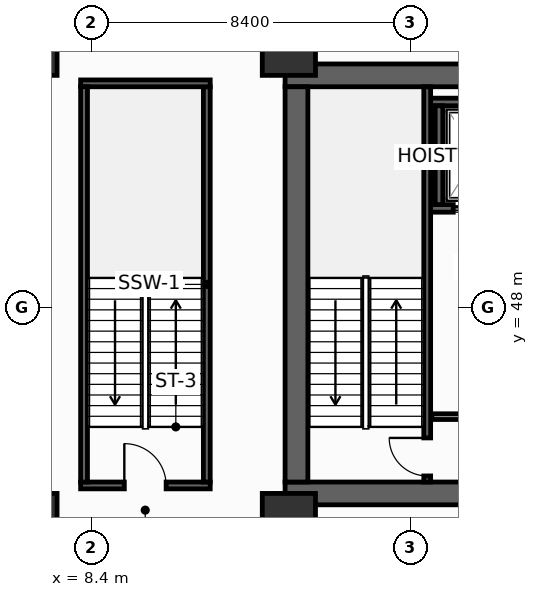
"""IFC4 building model, lengths in metres.
Left out: names, types, materials, properties, quantities, classifications, styles, units other than length and angle.
Written with IfcOpenShell. Run it as: python <this file> out.ifc"""

import sys

from ifc_helpers import new_model, si_unit, direction, frame, frame_2d, origin, origin_2d, place, context, subcontext, project, spatial, rectangle, hollow_rectangle, extrude, element, fill, save


model = new_model("IFC4")
c1 = context("Model", 3, precision=1e-05, world=origin(), true_north=direction((0.0, 1.0)))
c2 = subcontext(c1, "Body", "Model", "MODEL_VIEW")
j1 = project(units=[si_unit("LENGTHUNIT", "METRE"), si_unit("PLANEANGLEUNIT", "RADIAN")], contexts=[c1])
p1 = place(None, origin())
s1 = spatial("IfcSite", under=j1, at=p1, CompositionType="ELEMENT")
p2 = place(p1, origin())
s2 = spatial("IfcBuilding", under=s1, at=p2, CompositionType="ELEMENT")
p3 = place(p2, frame((0.0, 0.0, 6.0)))
s3 = spatial("IfcBuildingStorey", under=s2, at=p3, CompositionType="ELEMENT", Elevation=6.0)
p4 = place(p3, frame((13.5, 43.1, 0.0), z_axis=(0.0, 0.0, 1.0), x_axis=(1.0, 0.0, 0.0)))
e1 = element("IfcWall", 1, at=p4, inside=s3, PredefinedType="SHEAR", context=c2, shape_type="SweptSolid", body=[
    extrude(rectangle(XDim=32.9, YDim=0.6, at=frame_2d((16.45, 0.0))), origin(), (0.0, 0.0, 1.0), 5.1),
])
p5 = place(p4, frame((5.4, 0.0, 0.0)))
e2 = element("IfcOpeningElement", 2, at=p5, cuts=e1, PredefinedType="OPENING", context=c2, shape_type="SweptSolid", body=[
    extrude(rectangle(XDim=1.1, YDim=2.15, at=frame_2d((0.55, 1.075))), frame((0.0, 0.31, 0.0), z_axis=(0.0, -1.0, 0.0), x_axis=(1.0, 0.0, 0.0)), (0.0, 0.0, 1.0), 0.62),
])
p6 = place(p4, frame((25.6, 0.0, 0.0)))
e3 = element("IfcOpeningElement", 3, at=p6, cuts=e1, PredefinedType="OPENING", context=c2, shape_type="SweptSolid", body=[
    extrude(rectangle(XDim=1.1, YDim=2.15, at=frame_2d((0.55, 1.075))), frame((0.0, 0.31, 0.0), z_axis=(0.0, -1.0, 0.0), x_axis=(1.0, 0.0, 0.0)), (0.0, 0.0, 1.0), 0.62),
])
p7 = place(p3, frame((13.5, 54.1, 0.0), z_axis=(0.0, 0.0, 1.0), x_axis=(1.0, 0.0, 0.0)))
e4 = element("IfcWall", 4, at=p7, inside=s3, PredefinedType="SHEAR", context=c2, shape_type="SweptSolid", body=[
    extrude(rectangle(XDim=32.9, YDim=0.6, at=frame_2d((16.45, 0.0))), origin(), (0.0, 0.0, 1.0), 5.1),
])
p8 = place(p3, frame((13.8, 43.4, 0.0), z_axis=(0.0, 0.0, 1.0), x_axis=(0.0, 1.0, 0.0)))
e5 = element("IfcWall", 5, at=p8, inside=s3, PredefinedType="SHEAR", context=c2, shape_type="SweptSolid", body=[
    extrude(rectangle(XDim=10.4, YDim=0.6, at=frame_2d((5.2, 0.0))), origin(), (0.0, 0.0, 1.0), 5.1),
])
for number, where, z_axis, x_axis in (
    (6, (6.8, 54.8, 0.0), (0.0, 0.0, 1.0), (1.0, 0.0, 0.0)),
    (7, (13.6, 54.8, 0.0), (0.0, 0.0, 1.0), (1.0, 0.0, 0.0)),
    (8, (6.8, 42.4, 0.0), (0.0, 0.0, 1.0), (1.0, 0.0, 0.0)),
    (9, (13.6, 42.4, 0.0), (0.0, 0.0, 1.0), (1.0, 0.0, 0.0)),
):
    element("IfcColumn", number, at=place(p3, frame(where, z_axis=z_axis, x_axis=x_axis)), inside=s3, PredefinedType="COLUMN", context=c2, shape_type="SweptSolid", body=[
        extrude(hollow_rectangle(XDim=1.4, YDim=1.4, WallThickness=0.065, at=origin_2d()), origin(), (0.0, 0.0, 1.0), 5.4),
    ])
p9 = place(p3, frame((17.33, 50.6, 0.0), z_axis=(0.0, 0.0, 1.0), x_axis=(1.0, 0.0, 0.0)))
e10 = element("IfcWall", 10, at=p9, inside=s3, PredefinedType="SHEAR", context=c2, shape_type="SweptSolid", body=[
    extrude(rectangle(XDim=2.52, YDim=0.2, at=frame_2d((1.26, 0.0))), origin(), (0.0, 0.0, 1.0), 5.1),
])
p10 = place(p9, frame((0.595, 0.0, 0.0)))
e11 = element("IfcOpeningElement", 11, at=p10, cuts=e10, PredefinedType="OPENING", context=c2, shape_type="SweptSolid", body=[
    extrude(rectangle(XDim=1.25, YDim=2.3, at=frame_2d((0.625, 1.15))), frame((0.0, 0.11, 0.0), z_axis=(0.0, -1.0, 0.0), x_axis=(1.0, 0.0, 0.0)), (0.0, 0.0, 1.0), 0.22),
])
p11 = place(p3, frame((17.33, 53.4, 0.0), z_axis=(0.0, 0.0, 1.0), x_axis=(1.0, 0.0, 0.0)))
e12 = element("IfcWall", 12, at=p11, inside=s3, PredefinedType="SHEAR", context=c2, shape_type="SweptSolid", body=[
    extrude(rectangle(XDim=2.52, YDim=0.2, at=frame_2d((1.26, 0.0))), origin(), (0.0, 0.0, 1.0), 5.1),
])
p12 = place(p3, frame((17.55, 50.7, 0.0), z_axis=(0.0, 0.0, 1.0), x_axis=(0.0, 1.0, 0.0)))
e13 = element("IfcWall", 13, at=p12, inside=s3, PredefinedType="SHEAR", context=c2, shape_type="SweptSolid", body=[
    extrude(rectangle(XDim=2.6, YDim=0.2, at=frame_2d((1.3, 0.0))), origin(), (0.0, 0.0, 1.0), 5.1),
])
p13 = place(p3, frame((17.24, 43.4, 0.0), z_axis=(0.0, 0.0, 1.0), x_axis=(0.0, 1.0, 0.0)))
e14 = element("IfcWall", 14, at=p13, inside=s3, PredefinedType="SHEAR", context=c2, shape_type="SweptSolid", body=[
    extrude(rectangle(XDim=10.4, YDim=0.18, at=frame_2d((5.2, 0.0))), origin(), (0.0, 0.0, 1.0), 5.1),
])
p14 = place(p13, frame((0.16, 0.0, 0.0)))
e15 = element("IfcOpeningElement", 15, at=p14, cuts=e14, PredefinedType="OPENING", context=c2, shape_type="SweptSolid", body=[
    extrude(rectangle(XDim=1.0, YDim=2.15, at=frame_2d((0.5, 1.075))), frame((0.0, 0.1, 0.0), z_axis=(0.0, -1.0, 0.0), x_axis=(1.0, 0.0, 0.0)), (0.0, 0.0, 1.0), 0.2),
])
p15 = place(p3, frame((8.12, 43.31, 0.0), z_axis=(0.0, 0.0, 1.0), x_axis=(1.0, 0.0, 0.0)))
e16 = element("IfcWall", 16, at=p15, inside=s3, PredefinedType="SHEAR", context=c2, shape_type="SweptSolid", body=[
    extrude(rectangle(XDim=3.41, YDim=0.18, at=frame_2d((1.705, 0.0))), origin(), (0.0, 0.0, 1.0), 5.1),
])
p16 = place(p15, frame((1.15, 0.0, 0.0)))
e17 = element("IfcOpeningElement", 17, at=p16, cuts=e16, PredefinedType="OPENING", context=c2, shape_type="SweptSolid", body=[
    extrude(rectangle(XDim=1.1, YDim=2.15, at=frame_2d((0.55, 1.075))), frame((0.0, 0.1, 0.0), z_axis=(0.0, -1.0, 0.0), x_axis=(1.0, 0.0, 0.0)), (0.0, 0.0, 1.0), 0.2),
])
p17 = place(p3, frame((11.44, 43.4, 0.0), z_axis=(0.0, 0.0, 1.0), x_axis=(0.0, 1.0, 0.0)))
e18 = element("IfcWall", 18, at=p17, inside=s3, PredefinedType="SHEAR", context=c2, shape_type="SweptSolid", body=[
    extrude(rectangle(XDim=10.4, YDim=0.18, at=frame_2d((5.2, 0.0))), origin(), (0.0, 0.0, 1.0), 5.1),
])
p18 = place(p3, frame((11.53, 53.89, 0.0), z_axis=(0.0, 0.0, 1.0), x_axis=(-1.0, 0.0, 0.0)))
e19 = element("IfcWall", 19, at=p18, inside=s3, PredefinedType="SHEAR", context=c2, shape_type="SweptSolid", body=[
    extrude(rectangle(XDim=3.41, YDim=0.18, at=frame_2d((1.705, 0.0))), origin(), (0.0, 0.0, 1.0), 5.1),
])
p19 = place(p3, frame((8.21, 53.8, 0.0), z_axis=(0.0, 0.0, 1.0), x_axis=(0.0, -1.0, 0.0)))
e20 = element("IfcWall", 20, at=p19, inside=s3, PredefinedType="SHEAR", context=c2, shape_type="SweptSolid", body=[
    extrude(rectangle(XDim=10.4, YDim=0.18, at=frame_2d((5.2, 0.0))), origin(), (0.0, 0.0, 1.0), 5.1),
])
p20 = place(p3, frame((17.36, 45.12, 0.0), z_axis=(0.0, 0.0, 1.0), x_axis=(1.0, 0.0, 0.0)))
e21 = element("IfcWall", 21, at=p20, inside=s3, PredefinedType="PARTITIONING", context=c2, shape_type="SweptSolid", body=[
    extrude(rectangle(XDim=5.14, YDim=0.15, at=frame_2d((2.57, 0.0))), origin(), (0.0, 0.0, 1.0), 5.1),
])
p21 = place(p20, frame((1.8, 0.0, 0.0)))
e22 = element("IfcOpeningElement", 22, at=p21, cuts=e21, PredefinedType="OPENING", context=c2, shape_type="SweptSolid", body=[
    extrude(rectangle(XDim=1.1, YDim=2.15, at=frame_2d((0.55, 1.075))), frame((0.0, 0.085, 0.0), z_axis=(0.0, -1.0, 0.0), x_axis=(1.0, 0.0, 0.0)), (0.0, 0.0, 1.0), 0.17),
])
p22 = place(p10, origin())
e23 = element("IfcDoor", 23, at=p22, inside=s3, OperationType="SLIDING_TO_LEFT", PredefinedType="DOOR", context=c2, shape_type="SweptSolid", body=[
    extrude(rectangle(XDim=1.25, YDim=2.3, at=frame_2d((0.625, 1.15))), frame((0.0, 0.025, 0.0), z_axis=(0.0, -1.0, 0.0), x_axis=(1.0, 0.0, 0.0)), (0.0, 0.0, 1.0), 0.05),
])
fill(e11, e23)
p23 = place(p14, origin())
e24 = element("IfcDoor", 24, at=p23, inside=s3, OperationType="SINGLE_SWING_RIGHT", PredefinedType="DOOR", context=c2, shape_type="SweptSolid", body=[
    extrude(rectangle(XDim=1.0, YDim=2.15, at=frame_2d((0.5, 1.075))), frame((0.0, 0.025, 0.0), z_axis=(0.0, -1.0, 0.0), x_axis=(1.0, 0.0, 0.0)), (0.0, 0.0, 1.0), 0.05),
])
fill(e15, e24)
p24 = place(p16, origin())
e25 = element("IfcDoor", 25, at=p24, inside=s3, OperationType="SINGLE_SWING_LEFT", PredefinedType="DOOR", context=c2, shape_type="SweptSolid", body=[
    extrude(rectangle(XDim=1.1, YDim=2.15, at=frame_2d((0.55, 1.075))), frame((0.0, 0.025, 0.0), z_axis=(0.0, -1.0, 0.0), x_axis=(1.0, 0.0, 0.0)), (0.0, 0.0, 1.0), 0.05),
])
fill(e17, e25)
save(model, sys.argv[1])
